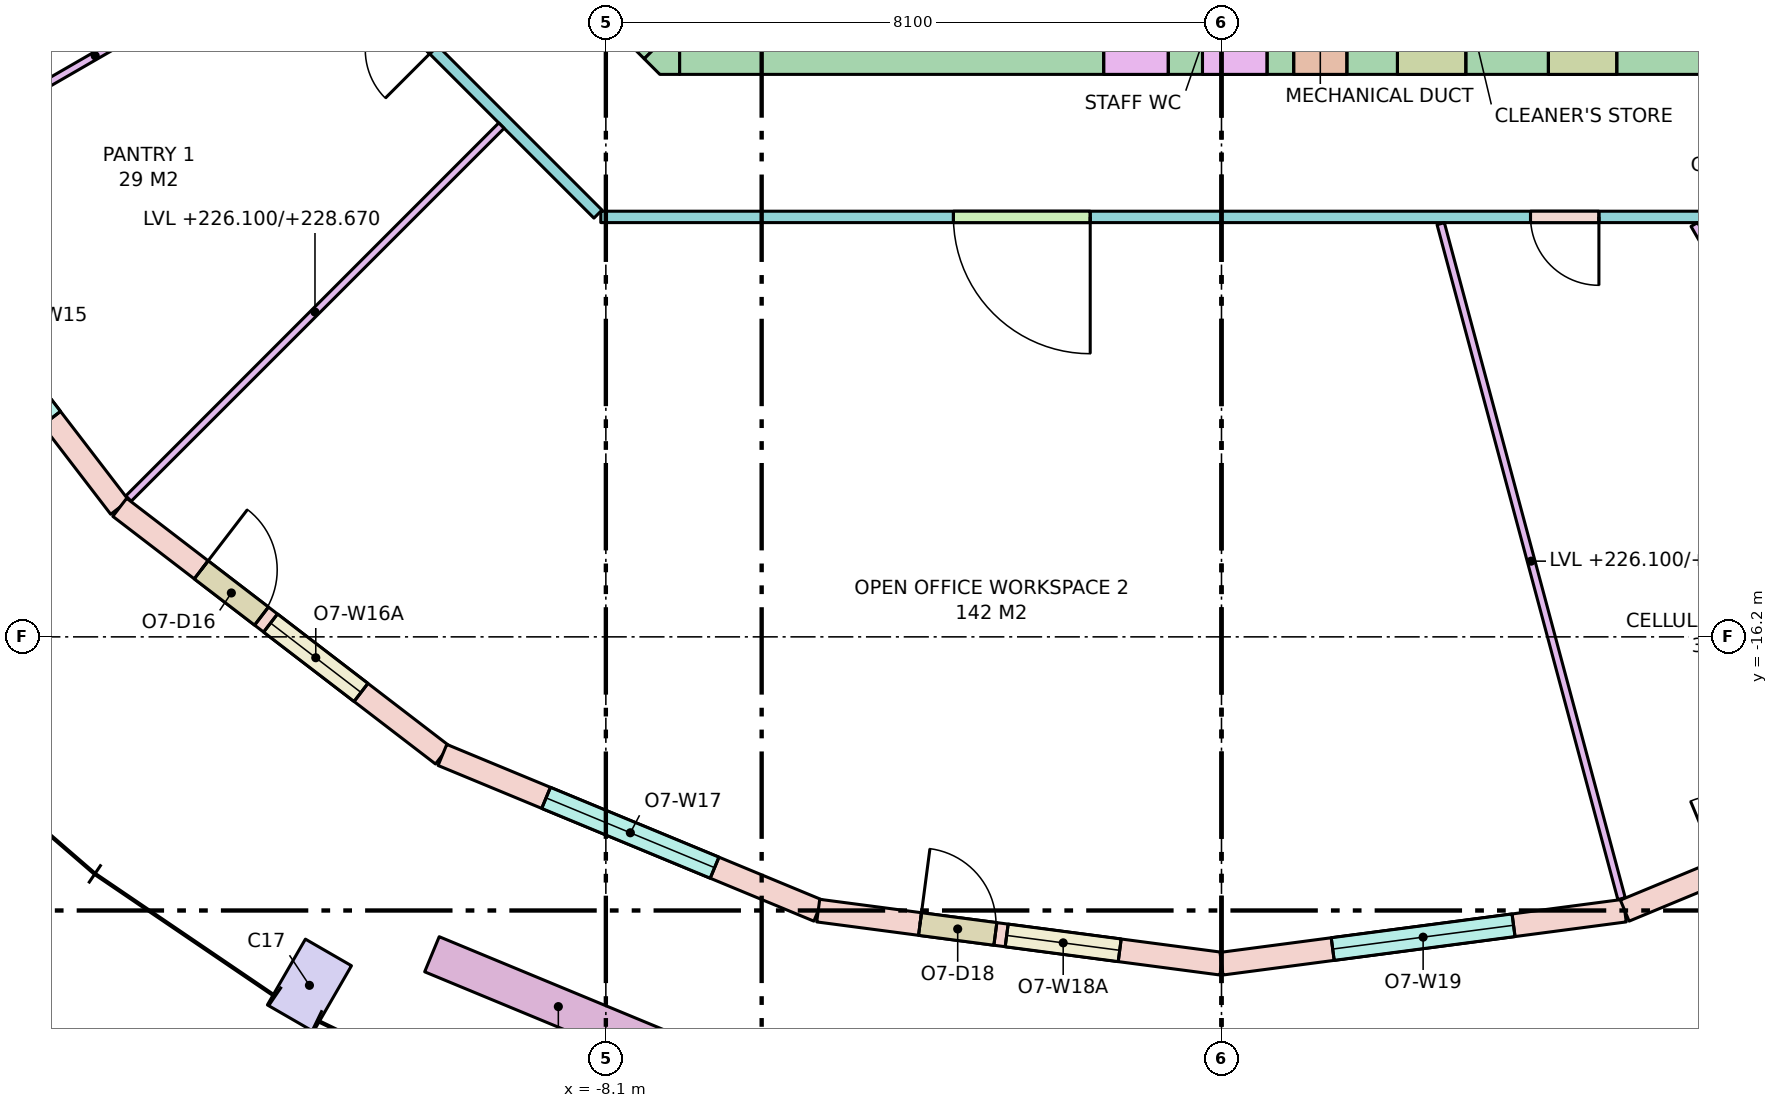
"""IFC4 building model, lengths in metres.
Left out: names, types, materials, properties, quantities, classifications, styles, units other than length and angle.
Written with IfcOpenShell. Run it as: python <this file> out.ifc"""

import sys

from ifc_helpers import new_model, si_unit, direction, frame, frame_2d, origin, origin_2d, place, context, subcontext, project, spatial, polyline, rectangle, outline, extrude, element, fill, save


model = new_model("IFC4")
c1 = context("Model", 3, precision=1e-05, world=origin(), true_north=direction((0.0, 1.0)))
c2 = subcontext(c1, "Body", "Model", "MODEL_VIEW")
j1 = project(units=[si_unit("LENGTHUNIT", "METRE"), si_unit("PLANEANGLEUNIT", "RADIAN")], contexts=[c1])
p1 = place(None, origin())
s1 = spatial("IfcSite", under=j1, at=p1, CompositionType="ELEMENT")
p2 = place(p1, origin())
s2 = spatial("IfcBuilding", under=s1, at=p2, CompositionType="ELEMENT")
p3 = place(p2, frame((0.0, 0.0, 226.1)))
s3 = spatial("IfcBuildingStorey", under=s2, at=p3, CompositionType="ELEMENT", Elevation=226.1)
p4 = place(p3, frame((-12.0, -20.785, 0.0), z_axis=(0.0, 0.0, 1.0), x_axis=(0.866025403784, -0.5, 0.0)))
e1 = element("IfcColumn", 1, at=p4, inside=s3, PredefinedType="COLUMN", context=c2, shape_type="SweptSolid", body=[
    extrude(rectangle(XDim=0.7, YDim=1.0, at=origin_2d()), origin(), (0.0, 0.0, 1.0), 3.7),
])
p5 = place(p3, frame((-7.13, -8.45, -0.28), z_axis=(0.0, 0.0, 1.0), x_axis=(1.0, 0.0, 0.0)))
e2 = element("IfcWall", 2, at=p5, inside=s3, PredefinedType="SHEAR", context=c2, shape_type="SweptSolid", body=[
    extrude(rectangle(XDim=14.26, YDim=0.7, at=frame_2d((7.13, 0.0))), origin(), (0.0, 0.0, 1.0), 3.7),
])
p6 = place(p5, frame((8.08, 0.0, 0.28)))
e3 = element("IfcOpeningElement", 3, at=p6, cuts=e2, PredefinedType="OPENING", context=c2, shape_type="SweptSolid", body=[
    extrude(rectangle(XDim=0.7, YDim=2.1, at=frame_2d((0.35, 1.05))), frame((0.0, 0.36, 0.0), z_axis=(0.0, -1.0, 0.0), x_axis=(1.0, 0.0, 0.0)), (0.0, 0.0, 1.0), 0.72),
])
p7 = place(p5, frame((5.58, 0.0, 0.28)))
e4 = element("IfcOpeningElement", 4, at=p7, cuts=e2, PredefinedType="OPENING", context=c2, shape_type="SweptSolid", body=[
    extrude(rectangle(XDim=0.85, YDim=2.1, at=frame_2d((0.425, 1.05))), frame((0.0, 0.36, 0.0), z_axis=(0.0, -1.0, 0.0), x_axis=(1.0, 0.0, 0.0)), (0.0, 0.0, 1.0), 0.72),
])
p8 = place(p5, frame((6.88, 0.0, 0.28)))
e5 = element("IfcOpeningElement", 5, at=p8, cuts=e2, PredefinedType="OPENING", context=c2, shape_type="SweptSolid", body=[
    extrude(rectangle(XDim=0.85, YDim=2.1, at=frame_2d((0.425, 1.05))), frame((0.0, 0.36, 0.0), z_axis=(0.0, -1.0, 0.0), x_axis=(1.0, 0.0, 0.0)), (0.0, 0.0, 1.0), 0.72),
])
p9 = place(p5, frame((9.445, 0.0, 0.28)))
e6 = element("IfcOpeningElement", 6, at=p9, cuts=e2, PredefinedType="OPENING", context=c2, shape_type="SweptSolid", body=[
    extrude(rectangle(XDim=0.9, YDim=2.1, at=frame_2d((0.45, 1.05))), frame((0.0, 0.36, 0.0), z_axis=(0.0, -1.0, 0.0), x_axis=(1.0, 0.0, 0.0)), (0.0, 0.0, 1.0), 0.72),
])
p10 = place(p5, frame((11.431, 0.0, 0.28)))
e7 = element("IfcOpeningElement", 7, at=p10, cuts=e2, PredefinedType="OPENING", context=c2, shape_type="SweptSolid", body=[
    extrude(rectangle(XDim=0.9, YDim=2.1, at=frame_2d((0.45, 1.05))), frame((0.0, 0.36, 0.0), z_axis=(0.0, -1.0, 0.0), x_axis=(1.0, 0.0, 0.0)), (0.0, 0.0, 1.0), 0.72),
])
p11 = place(p3, frame((-7.347, -8.347, -0.28), z_axis=(0.0, 0.0, 1.0), x_axis=(-0.707106781187, 0.707106781187, 0.0)))
e8 = element("IfcWall", 8, at=p11, inside=s3, PredefinedType="SHEAR", context=c2, shape_type="SweptSolid", body=[
    extrude(rectangle(XDim=4.243, YDim=0.7, at=frame_2d((2.121, 0.0))), origin(), (0.0, 0.0, 1.0), 3.7),
])
p12 = place(p11, frame((2.393, 0.0, 0.28)))
e9 = element("IfcOpeningElement", 9, at=p12, cuts=e8, PredefinedType="OPENING", context=c2, shape_type="SweptSolid", body=[
    extrude(rectangle(XDim=1.2, YDim=2.1, at=frame_2d((0.6, 1.05))), frame((0.0, 0.36, 0.0), z_axis=(0.0, -1.0, 0.0), x_axis=(1.0, 0.0, 0.0)), (0.0, 0.0, 1.0), 0.72),
])
p13 = place(p3, frame((0.0, 0.0, -0.28)))
e10 = element("IfcWall", 10, at=p13, inside=s3, PredefinedType="SHEAR", context=c2, shape_type="SweptSolid", body=[
    extrude(outline(polyline([(-7.39, -8.8), (-7.595, -8.595), (-7.595, -8.595), (-7.595, -8.595), (-7.13, -8.13), (-7.13, -8.8), (-7.13, -8.8), (-7.39, -8.8)])), origin(), (0.0, 0.0, 1.0), 3.7),
])
p14 = place(p3, frame((-17.753, -10.25, 0.0), z_axis=(0.0, 0.0, 1.0), x_axis=(0.60876670321, -0.793349293227, 0.0)))
e11 = element("IfcWall", 11, at=p14, inside=s3, PredefinedType="STANDARD", context=c2, shape_type="SweptSolid", body=[
    extrude(rectangle(XDim=5.352, YDim=0.3, at=frame_2d((2.676, 0.0))), origin(), (0.0, 0.0, 1.0), 3.42),
])
p15 = place(p14, frame((1.476, 0.0, 0.8)))
e12 = element("IfcOpeningElement", 12, at=p15, cuts=e11, PredefinedType="OPENING", context=c2, shape_type="SweptSolid", body=[
    extrude(rectangle(XDim=2.4, YDim=2.4, at=frame_2d((1.2, 1.2))), frame((0.0, 0.16, 0.0), z_axis=(0.0, -1.0, 0.0), x_axis=(1.0, 0.0, 0.0)), (0.0, 0.0, 1.0), 0.32),
])
p16 = place(p3, frame((-14.496, -14.496, 0.0), z_axis=(0.0, 0.0, 1.0), x_axis=(0.793349293227, -0.60876670321, 0.0)))
e13 = element("IfcWall", 13, at=p16, inside=s3, PredefinedType="STANDARD", context=c2, shape_type="SweptSolid", body=[
    extrude(rectangle(XDim=5.352, YDim=0.3, at=frame_2d((2.676, 0.0))), origin(), (0.0, 0.0, 1.0), 3.42),
])
p17 = place(p16, frame((1.351, 0.0, 0.0)))
e14 = element("IfcOpeningElement", 14, at=p17, cuts=e13, PredefinedType="OPENING", context=c2, shape_type="SweptSolid", body=[
    extrude(rectangle(XDim=1.0, YDim=2.4, at=frame_2d((0.5, 1.2))), frame((0.0, 0.16, 0.0), z_axis=(0.0, -1.0, 0.0), x_axis=(1.0, 0.0, 0.0)), (0.0, 0.0, 1.0), 0.32),
])
p18 = place(p16, frame((2.501, 0.0, 0.8)))
e15 = element("IfcOpeningElement", 15, at=p18, cuts=e13, PredefinedType="OPENING", context=c2, shape_type="SweptSolid", body=[
    extrude(rectangle(XDim=1.5, YDim=2.4, at=frame_2d((0.75, 1.2))), frame((0.0, 0.16, 0.0), z_axis=(0.0, -1.0, 0.0), x_axis=(1.0, 0.0, 0.0)), (0.0, 0.0, 1.0), 0.32),
])
p19 = place(p3, frame((-10.25, -17.753, 0.0), z_axis=(0.0, 0.0, 1.0), x_axis=(0.923867255172, -0.382713071139, 0.0)))
e16 = element("IfcWall", 16, at=p19, inside=s3, PredefinedType="STANDARD", context=c2, shape_type="SweptSolid", body=[
    extrude(rectangle(XDim=5.352, YDim=0.3, at=frame_2d((2.676, 0.0))), origin(), (0.0, 0.0, 1.0), 3.42),
])
p20 = place(p19, frame((1.476, 0.0, 0.8)))
e17 = element("IfcOpeningElement", 17, at=p20, cuts=e16, PredefinedType="OPENING", context=c2, shape_type="SweptSolid", body=[
    extrude(rectangle(XDim=2.4, YDim=2.4, at=frame_2d((1.2, 1.2))), frame((0.0, 0.16, 0.0), z_axis=(0.0, -1.0, 0.0), x_axis=(1.0, 0.0, 0.0)), (0.0, 0.0, 1.0), 0.32),
])
p21 = place(p3, frame((-5.306, -19.802, 0.0), z_axis=(0.0, 0.0, 1.0), x_axis=(0.991446064069, -0.130517056518, 0.0)))
e18 = element("IfcWall", 18, at=p21, inside=s3, PredefinedType="STANDARD", context=c2, shape_type="SweptSolid", body=[
    extrude(rectangle(XDim=5.352, YDim=0.3, at=frame_2d((2.676, 0.0))), origin(), (0.0, 0.0, 1.0), 3.42),
])
p22 = place(p21, frame((1.351, 0.0, 0.0)))
e19 = element("IfcOpeningElement", 19, at=p22, cuts=e18, PredefinedType="OPENING", context=c2, shape_type="SweptSolid", body=[
    extrude(rectangle(XDim=1.0, YDim=2.4, at=frame_2d((0.5, 1.2))), frame((0.0, 0.16, 0.0), z_axis=(0.0, -1.0, 0.0), x_axis=(1.0, 0.0, 0.0)), (0.0, 0.0, 1.0), 0.32),
])
p23 = place(p21, frame((2.501, 0.0, 0.8)))
e20 = element("IfcOpeningElement", 20, at=p23, cuts=e18, PredefinedType="OPENING", context=c2, shape_type="SweptSolid", body=[
    extrude(rectangle(XDim=1.5, YDim=2.4, at=frame_2d((0.75, 1.2))), frame((0.0, 0.16, 0.0), z_axis=(0.0, -1.0, 0.0), x_axis=(1.0, 0.0, 0.0)), (0.0, 0.0, 1.0), 0.32),
])
p24 = place(p3, frame((0.0, -20.5, 0.0), z_axis=(0.0, 0.0, 1.0), x_axis=(0.991446064069, 0.130517056518, 0.0)))
e21 = element("IfcWall", 21, at=p24, inside=s3, PredefinedType="STANDARD", context=c2, shape_type="SweptSolid", body=[
    extrude(rectangle(XDim=5.352, YDim=0.3, at=frame_2d((2.676, 0.0))), origin(), (0.0, 0.0, 1.0), 3.42),
])
p25 = place(p24, frame((1.476, 0.0, 0.8)))
e22 = element("IfcOpeningElement", 22, at=p25, cuts=e21, PredefinedType="OPENING", context=c2, shape_type="SweptSolid", body=[
    extrude(rectangle(XDim=2.4, YDim=2.4, at=frame_2d((1.2, 1.2))), frame((0.0, 0.16, 0.0), z_axis=(0.0, -1.0, 0.0), x_axis=(1.0, 0.0, 0.0)), (0.0, 0.0, 1.0), 0.32),
])
p26 = place(p3, frame((5.306, -19.802, 0.0), z_axis=(0.0, 0.0, 1.0), x_axis=(0.923867255172, 0.382713071139, 0.0)))
e23 = element("IfcWall", 23, at=p26, inside=s3, PredefinedType="STANDARD", context=c2, shape_type="SweptSolid", body=[
    extrude(rectangle(XDim=5.352, YDim=0.3, at=frame_2d((2.676, 0.0))), origin(), (0.0, 0.0, 1.0), 3.42),
])
p27 = place(p26, frame((1.351, 0.0, 0.0)))
e24 = element("IfcOpeningElement", 24, at=p27, cuts=e23, PredefinedType="OPENING", context=c2, shape_type="SweptSolid", body=[
    extrude(rectangle(XDim=1.0, YDim=2.4, at=frame_2d((0.5, 1.2))), frame((0.0, 0.16, 0.0), z_axis=(0.0, -1.0, 0.0), x_axis=(1.0, 0.0, 0.0)), (0.0, 0.0, 1.0), 0.32),
])
p28 = place(p26, frame((2.501, 0.0, 0.8)))
e25 = element("IfcOpeningElement", 25, at=p28, cuts=e23, PredefinedType="OPENING", context=c2, shape_type="SweptSolid", body=[
    extrude(rectangle(XDim=1.5, YDim=2.4, at=frame_2d((0.75, 1.2))), frame((0.0, 0.16, 0.0), z_axis=(0.0, -1.0, 0.0), x_axis=(1.0, 0.0, 0.0)), (0.0, 0.0, 1.0), 0.32),
])
p29 = place(p3, frame((-10.388, -20.375, 0.0), z_axis=(0.0, 0.0, 1.0), x_axis=(0.923851510231, -0.38275107713, 0.0)))
e26 = element("IfcWall", 26, at=p29, inside=s3, PredefinedType="PARAPET", context=c2, shape_type="SweptSolid", body=[
    extrude(rectangle(XDim=3.6, YDim=0.5, at=frame_2d((1.8, 0.0))), origin(), (0.0, 0.0, 1.0), 0.9),
])
p30 = place(p3, frame((8.167, -10.675, 0.0), z_axis=(0.0, 0.0, 1.0), x_axis=(-1.0, 0.0, 0.0)))
e27 = element("IfcWall", 27, at=p30, inside=s3, PredefinedType="PARTITIONING", context=c2, shape_type="SweptSolid", body=[
    extrude(rectangle(XDim=16.333, YDim=0.15, at=frame_2d((8.167, 0.0))), origin(), (0.0, 0.0, 1.0), 2.57),
])
p31 = place(p30, frame((9.894, 0.0, 0.0)))
e28 = element("IfcOpeningElement", 28, at=p31, cuts=e27, PredefinedType="OPENING", context=c2, shape_type="SweptSolid", body=[
    extrude(rectangle(XDim=1.8, YDim=2.1, at=frame_2d((0.9, 1.05))), frame((0.0, 0.085, 0.0), z_axis=(0.0, -1.0, 0.0), x_axis=(1.0, 0.0, 0.0)), (0.0, 0.0, 1.0), 0.17),
])
p32 = place(p30, frame((3.201, 0.0, 0.0)))
e29 = element("IfcOpeningElement", 29, at=p32, cuts=e27, PredefinedType="OPENING", context=c2, shape_type="SweptSolid", body=[
    extrude(rectangle(XDim=0.9, YDim=2.1, at=frame_2d((0.45, 1.05))), frame((0.0, 0.085, 0.0), z_axis=(0.0, -1.0, 0.0), x_axis=(1.0, 0.0, 0.0)), (0.0, 0.0, 1.0), 0.17),
])
p33 = place(p3, frame((-8.204, -10.638, 0.0), z_axis=(0.0, 0.0, 1.0), x_axis=(-0.707106781187, 0.707106781187, 0.0)))
e30 = element("IfcWall", 30, at=p33, inside=s3, PredefinedType="PARTITIONING", context=c2, shape_type="SweptSolid", body=[
    extrude(rectangle(XDim=6.271, YDim=0.15, at=frame_2d((3.135, 0.0))), origin(), (0.0, 0.0, 1.0), 2.57),
])
p34 = place(p33, frame((3.057, 0.0, 0.0)))
e31 = element("IfcOpeningElement", 31, at=p34, cuts=e30, PredefinedType="OPENING", context=c2, shape_type="SweptSolid", body=[
    extrude(rectangle(XDim=0.9, YDim=2.1, at=frame_2d((0.45, 1.05))), frame((0.0, 0.085, 0.0), z_axis=(0.0, -1.0, 0.0), x_axis=(1.0, 0.0, 0.0)), (0.0, 0.0, 1.0), 0.17),
])
p35 = place(p3, frame((-12.025, -6.943, 0.0), z_axis=(0.0, 0.0, 1.0), x_axis=(-0.866026773083, -0.499997628298, 0.0)))
e32 = element("IfcWall", 32, at=p35, inside=s3, PredefinedType="PARTITIONING", context=c2, shape_type="SweptSolid", body=[
    extrude(rectangle(XDim=6.451, YDim=0.1, at=frame_2d((3.226, 0.0))), origin(), (0.0, 0.0, 1.0), 2.57),
])
p36 = place(p3, frame((-9.474, -9.474, 0.0), z_axis=(0.0, 0.0, 1.0), x_axis=(-0.707106781187, -0.707106781187, 0.0)))
e33 = element("IfcWall", 33, at=p36, inside=s3, PredefinedType="PARTITIONING", context=c2, shape_type="SweptSolid", body=[
    extrude(rectangle(XDim=6.938, YDim=0.1, at=frame_2d((3.469, 0.0))), origin(), (0.0, 0.0, 1.0), 2.57),
])
p37 = place(p3, frame((2.884, -10.764, 0.0), z_axis=(0.0, 0.0, 1.0), x_axis=(0.258811310764, -0.965927898666, 0.0)))
e34 = element("IfcWall", 34, at=p37, inside=s3, PredefinedType="PARTITIONING", context=c2, shape_type="SweptSolid", body=[
    extrude(rectangle(XDim=9.193, YDim=0.1, at=frame_2d((4.596, 0.0))), origin(), (0.0, 0.0, 1.0), 2.57),
])
p38 = place(p3, frame((6.221, -10.775, 0.0), z_axis=(0.0, 0.0, 1.0), x_axis=(0.500016891966, -0.866015650984, 0.0)))
e35 = element("IfcWall", 35, at=p38, inside=s3, PredefinedType="PARTITIONING", context=c2, shape_type="SweptSolid", body=[
    extrude(rectangle(XDim=7.895, YDim=0.1, at=frame_2d((3.948, 0.0))), origin(), (0.0, 0.0, 1.0), 2.57),
])
p39 = place(p15, origin())
e36 = element("IfcWindow", 36, at=p39, inside=s3, PartitioningType="SINGLE_PANEL", PredefinedType="WINDOW", context=c2, shape_type="SweptSolid", body=[
    extrude(rectangle(XDim=2.4, YDim=2.4, at=frame_2d((1.2, 1.2))), frame((0.0, 0.03, 0.0), z_axis=(0.0, -1.0, 0.0), x_axis=(1.0, 0.0, 0.0)), (0.0, 0.0, 1.0), 0.06),
])
fill(e12, e36)
p40 = place(p17, origin())
e37 = element("IfcDoor", 37, at=p40, inside=s3, OperationType="SINGLE_SWING_LEFT", PredefinedType="DOOR", context=c2, shape_type="SweptSolid", body=[
    extrude(rectangle(XDim=1.0, YDim=2.4, at=frame_2d((0.5, 1.2))), frame((0.0, 0.025, 0.0), z_axis=(0.0, -1.0, 0.0), x_axis=(1.0, 0.0, 0.0)), (0.0, 0.0, 1.0), 0.05),
])
fill(e14, e37)
p41 = place(p18, origin())
e38 = element("IfcWindow", 38, at=p41, inside=s3, PartitioningType="SINGLE_PANEL", PredefinedType="WINDOW", context=c2, shape_type="SweptSolid", body=[
    extrude(rectangle(XDim=1.5, YDim=2.4, at=frame_2d((0.75, 1.2))), frame((0.0, 0.03, 0.0), z_axis=(0.0, -1.0, 0.0), x_axis=(1.0, 0.0, 0.0)), (0.0, 0.0, 1.0), 0.06),
])
fill(e15, e38)
p42 = place(p20, origin())
e39 = element("IfcWindow", 39, at=p42, inside=s3, PartitioningType="SINGLE_PANEL", PredefinedType="WINDOW", context=c2, shape_type="SweptSolid", body=[
    extrude(rectangle(XDim=2.4, YDim=2.4, at=frame_2d((1.2, 1.2))), frame((0.0, 0.03, 0.0), z_axis=(0.0, -1.0, 0.0), x_axis=(1.0, 0.0, 0.0)), (0.0, 0.0, 1.0), 0.06),
])
fill(e17, e39)
p43 = place(p22, origin())
e40 = element("IfcDoor", 40, at=p43, inside=s3, OperationType="SINGLE_SWING_LEFT", PredefinedType="DOOR", context=c2, shape_type="SweptSolid", body=[
    extrude(rectangle(XDim=1.0, YDim=2.4, at=frame_2d((0.5, 1.2))), frame((0.0, 0.025, 0.0), z_axis=(0.0, -1.0, 0.0), x_axis=(1.0, 0.0, 0.0)), (0.0, 0.0, 1.0), 0.05),
])
fill(e19, e40)
p44 = place(p23, origin())
e41 = element("IfcWindow", 41, at=p44, inside=s3, PartitioningType="SINGLE_PANEL", PredefinedType="WINDOW", context=c2, shape_type="SweptSolid", body=[
    extrude(rectangle(XDim=1.5, YDim=2.4, at=frame_2d((0.75, 1.2))), frame((0.0, 0.03, 0.0), z_axis=(0.0, -1.0, 0.0), x_axis=(1.0, 0.0, 0.0)), (0.0, 0.0, 1.0), 0.06),
])
fill(e20, e41)
p45 = place(p25, origin())
e42 = element("IfcWindow", 42, at=p45, inside=s3, PartitioningType="SINGLE_PANEL", PredefinedType="WINDOW", context=c2, shape_type="SweptSolid", body=[
    extrude(rectangle(XDim=2.4, YDim=2.4, at=frame_2d((1.2, 1.2))), frame((0.0, 0.03, 0.0), z_axis=(0.0, -1.0, 0.0), x_axis=(1.0, 0.0, 0.0)), (0.0, 0.0, 1.0), 0.06),
])
fill(e22, e42)
p46 = place(p31, origin())
e43 = element("IfcDoor", 43, at=p46, inside=s3, OperationType="DOUBLE_DOOR_SINGLE_SWING", PredefinedType="DOOR", context=c2, shape_type="SweptSolid", body=[
    extrude(rectangle(XDim=1.8, YDim=2.1, at=frame_2d((0.9, 1.05))), frame((0.0, 0.025, 0.0), z_axis=(0.0, -1.0, 0.0), x_axis=(1.0, 0.0, 0.0)), (0.0, 0.0, 1.0), 0.05),
])
fill(e28, e43)
p47 = place(p32, origin())
e44 = element("IfcDoor", 44, at=p47, inside=s3, OperationType="SINGLE_SWING_LEFT", PredefinedType="DOOR", context=c2, shape_type="SweptSolid", body=[
    extrude(rectangle(XDim=0.9, YDim=2.1, at=frame_2d((0.45, 1.05))), frame((0.0, 0.025, 0.0), z_axis=(0.0, -1.0, 0.0), x_axis=(1.0, 0.0, 0.0)), (0.0, 0.0, 1.0), 0.05),
])
fill(e29, e44)
save(model, sys.argv[1])
